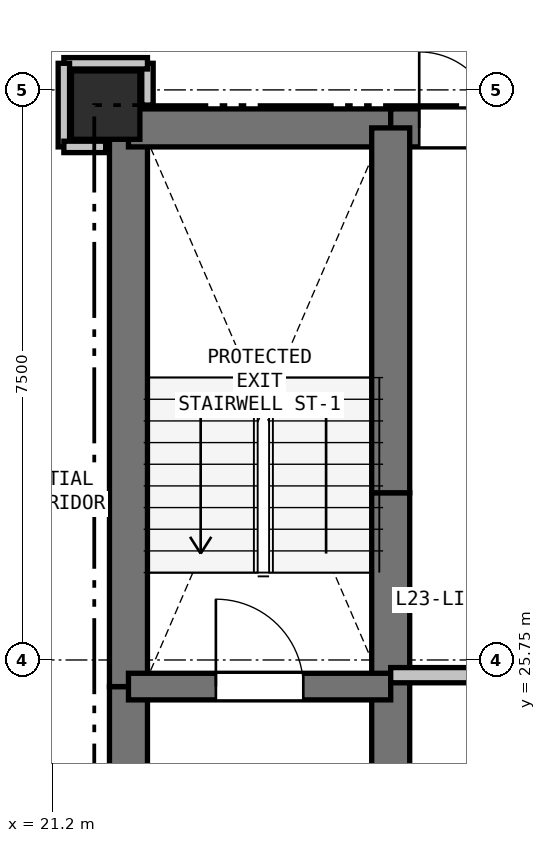
"""IFC4 building model, lengths in metres.
Left out: names, types, materials, properties, quantities, classifications, styles, units other than length and angle.
Written with IfcOpenShell. Run it as: python <this file> out.ifc"""

import sys

from ifc_helpers import new_model, si_unit, direction, frame, frame_2d, origin, origin_2d, place, context, subcontext, project, spatial, rectangle, extrude, element, fill, save


model = new_model("IFC4")
c1 = context("Model", 3, precision=1e-05, world=origin(), true_north=direction((0.0, 1.0)))
c2 = subcontext(c1, "Body", "Model", "MODEL_VIEW")
j1 = project(units=[si_unit("LENGTHUNIT", "METRE"), si_unit("PLANEANGLEUNIT", "RADIAN")], contexts=[c1])
p1 = place(None, origin())
s1 = spatial("IfcSite", under=j1, at=p1, CompositionType="ELEMENT")
p2 = place(p1, origin())
s2 = spatial("IfcBuilding", under=s1, at=p2, CompositionType="ELEMENT")
p3 = place(p2, frame((0.0, 0.0, 86.7)))
s3 = spatial("IfcBuildingStorey", under=s2, at=p3, CompositionType="ELEMENT", Elevation=86.7)
p4 = place(p3, frame((21.9, 33.05, 0.0), z_axis=(0.0, 0.0, 1.0), x_axis=(1.0, 0.0, 0.0)))
e1 = element("IfcColumn", 1, at=p4, inside=s3, PredefinedType="COLUMN", context=c2, shape_type="SweptSolid", body=[
    extrude(rectangle(XDim=0.9, YDim=0.9, at=origin_2d()), origin(), (0.0, 0.0, 1.0), 3.3),
])
p5 = place(p3, frame((22.2, 20.75, 0.0), z_axis=(0.0, 0.0, 1.0), x_axis=(0.0, 1.0, 0.0)))
e2 = element("IfcWall", 2, at=p5, inside=s3, PredefinedType="SHEAR", context=c2, shape_type="SweptSolid", body=[
    extrude(rectangle(XDim=4.65, YDim=0.5, at=frame_2d((2.325, 0.0))), origin(), (0.0, 0.0, 1.0), 3.05),
])
p6 = place(p3, frame((22.2, 25.4, 0.0), z_axis=(0.0, 0.0, 1.0), x_axis=(0.0, 1.0, 0.0)))
e3 = element("IfcWall", 3, at=p6, inside=s3, PredefinedType="SHEAR", context=c2, shape_type="SweptSolid", body=[
    extrude(rectangle(XDim=7.35, YDim=0.5, at=frame_2d((3.675, 0.0))), origin(), (0.0, 0.0, 1.0), 3.05),
])
p7 = place(p3, frame((22.2, 32.75, 0.0), z_axis=(0.0, 0.0, 1.0), x_axis=(1.0, 0.0, 0.0)))
e4 = element("IfcWall", 4, at=p7, inside=s3, PredefinedType="SHEAR", context=c2, shape_type="SweptSolid", body=[
    extrude(rectangle(XDim=3.45, YDim=0.5, at=frame_2d((1.725, 0.0))), origin(), (0.0, 0.0, 1.0), 3.05),
])
p8 = place(p3, frame((25.65, 32.75, 0.0), z_axis=(0.0, 0.0, 1.0), x_axis=(1.0, 0.0, 0.0)))
e5 = element("IfcWall", 5, at=p8, inside=s3, PredefinedType="SHEAR", context=c2, shape_type="SweptSolid", body=[
    extrude(rectangle(XDim=1.75, YDim=0.5, at=frame_2d((0.875, 0.0))), origin(), (0.0, 0.0, 1.0), 3.05),
])
p9 = place(p8, frame((0.375, 0.0, 0.0)))
e6 = element("IfcOpeningElement", 6, at=p9, cuts=e5, PredefinedType="OPENING", context=c2, shape_type="SweptSolid", body=[
    extrude(rectangle(XDim=1.0, YDim=2.15, at=frame_2d((0.5, 1.075))), frame((0.0, 0.26, 0.0), z_axis=(0.0, -1.0, 0.0), x_axis=(1.0, 0.0, 0.0)), (0.0, 0.0, 1.0), 0.52),
])
p10 = place(p3, frame((25.65, 22.75, 0.0), z_axis=(0.0, 0.0, 1.0), x_axis=(0.0, 1.0, 0.0)))
e7 = element("IfcWall", 7, at=p10, inside=s3, PredefinedType="SHEAR", context=c2, shape_type="SweptSolid", body=[
    extrude(rectangle(XDim=2.8, YDim=0.5, at=frame_2d((1.4, 0.0))), origin(), (0.0, 0.0, 1.0), 3.05),
])
p11 = place(p3, frame((25.65, 25.55, 0.0), z_axis=(0.0, 0.0, 1.0), x_axis=(0.0, 1.0, 0.0)))
e8 = element("IfcWall", 8, at=p11, inside=s3, PredefinedType="SHEAR", context=c2, shape_type="SweptSolid", body=[
    extrude(rectangle(XDim=2.4, YDim=0.5, at=frame_2d((1.2, 0.0))), origin(), (0.0, 0.0, 1.0), 3.05),
])
p12 = place(p3, frame((25.65, 27.95, 0.0), z_axis=(0.0, 0.0, 1.0), x_axis=(0.0, 1.0, 0.0)))
e9 = element("IfcWall", 9, at=p12, inside=s3, PredefinedType="SHEAR", context=c2, shape_type="SweptSolid", body=[
    extrude(rectangle(XDim=4.8, YDim=0.5, at=frame_2d((2.4, 0.0))), origin(), (0.0, 0.0, 1.0), 3.05),
])
p13 = place(p3, frame((22.2, 25.4, 0.0), z_axis=(0.0, 0.0, 1.0), x_axis=(1.0, 0.0, 0.0)))
e10 = element("IfcWall", 10, at=p13, inside=s3, PredefinedType="SHEAR", context=c2, shape_type="SweptSolid", body=[
    extrude(rectangle(XDim=3.45, YDim=0.35, at=frame_2d((1.725, 0.0))), origin(), (0.0, 0.0, 1.0), 3.05),
])
p14 = place(p13, frame((1.15, 0.0, 0.0)))
e11 = element("IfcOpeningElement", 11, at=p14, cuts=e10, PredefinedType="OPENING", context=c2, shape_type="SweptSolid", body=[
    extrude(rectangle(XDim=1.15, YDim=2.15, at=frame_2d((0.575, 1.075))), frame((0.0, 0.185, 0.0), z_axis=(0.0, -1.0, 0.0), x_axis=(1.0, 0.0, 0.0)), (0.0, 0.0, 1.0), 0.37),
])
p15 = place(p3, frame((25.65, 25.55, 0.0), z_axis=(0.0, 0.0, 1.0), x_axis=(1.0, 0.0, 0.0)))
e12 = element("IfcWall", 12, at=p15, inside=s3, PredefinedType="PARTITIONING", context=c2, shape_type="SweptSolid", body=[
    extrude(rectangle(XDim=4.95, YDim=0.2, at=frame_2d((2.475, 0.0))), origin(), (0.0, 0.0, 1.0), 3.05),
])
p16 = place(p3, frame((22.45, 33.05, 0.0), z_axis=(0.0, 0.0, 1.0), x_axis=(0.0, 1.0, 0.0)))
e13 = element("IfcWall", 13, at=p16, inside=s3, PredefinedType="PARTITIONING", context=c2, shape_type="SweptSolid", body=[
    extrude(rectangle(XDim=0.55, YDim=0.15, at=frame_2d((0.275, 0.0))), origin(), (0.0, 0.0, 1.0), 2.498),
])
p17 = place(p3, frame((22.45, 33.6, 0.0), z_axis=(0.0, 0.0, 1.0), x_axis=(-1.0, 0.0, 0.0)))
e14 = element("IfcWall", 14, at=p17, inside=s3, PredefinedType="PARTITIONING", context=c2, shape_type="SweptSolid", body=[
    extrude(rectangle(XDim=1.1, YDim=0.15, at=frame_2d((0.55, 0.0))), origin(), (0.0, 0.0, 1.0), 3.05),
])
p18 = place(p3, frame((21.35, 33.6, 0.0), z_axis=(0.0, 0.0, 1.0), x_axis=(0.0, -1.0, 0.0)))
e15 = element("IfcWall", 15, at=p18, inside=s3, PredefinedType="PARTITIONING", context=c2, shape_type="SweptSolid", body=[
    extrude(rectangle(XDim=1.1, YDim=0.15, at=frame_2d((0.55, 0.0))), origin(), (0.0, 0.0, 1.0), 2.423),
])
p19 = place(p3, frame((21.35, 32.5, 0.0), z_axis=(0.0, 0.0, 1.0), x_axis=(1.0, 0.0, 0.0)))
e16 = element("IfcWall", 16, at=p19, inside=s3, PredefinedType="PARTITIONING", context=c2, shape_type="SweptSolid", body=[
    extrude(rectangle(XDim=0.55, YDim=0.15, at=frame_2d((0.275, 0.0))), origin(), (0.0, 0.0, 1.0), 2.498),
])
p20 = place(p9, origin())
e17 = element("IfcDoor", 17, at=p20, inside=s3, OperationType="SINGLE_SWING_LEFT", PredefinedType="DOOR", context=c2, shape_type="SweptSolid", body=[
    extrude(rectangle(XDim=1.0, YDim=2.15, at=frame_2d((0.5, 1.075))), frame((0.0, 0.025, 0.0), z_axis=(0.0, -1.0, 0.0), x_axis=(1.0, 0.0, 0.0)), (0.0, 0.0, 1.0), 0.05),
])
fill(e6, e17)
p21 = place(p14, origin())
e18 = element("IfcDoor", 18, at=p21, inside=s3, OperationType="SINGLE_SWING_LEFT", PredefinedType="DOOR", context=c2, shape_type="SweptSolid", body=[
    extrude(rectangle(XDim=1.15, YDim=2.15, at=frame_2d((0.575, 1.075))), frame((0.0, 0.025, 0.0), z_axis=(0.0, -1.0, 0.0), x_axis=(1.0, 0.0, 0.0)), (0.0, 0.0, 1.0), 0.05),
])
fill(e11, e18)
save(model, sys.argv[1])
